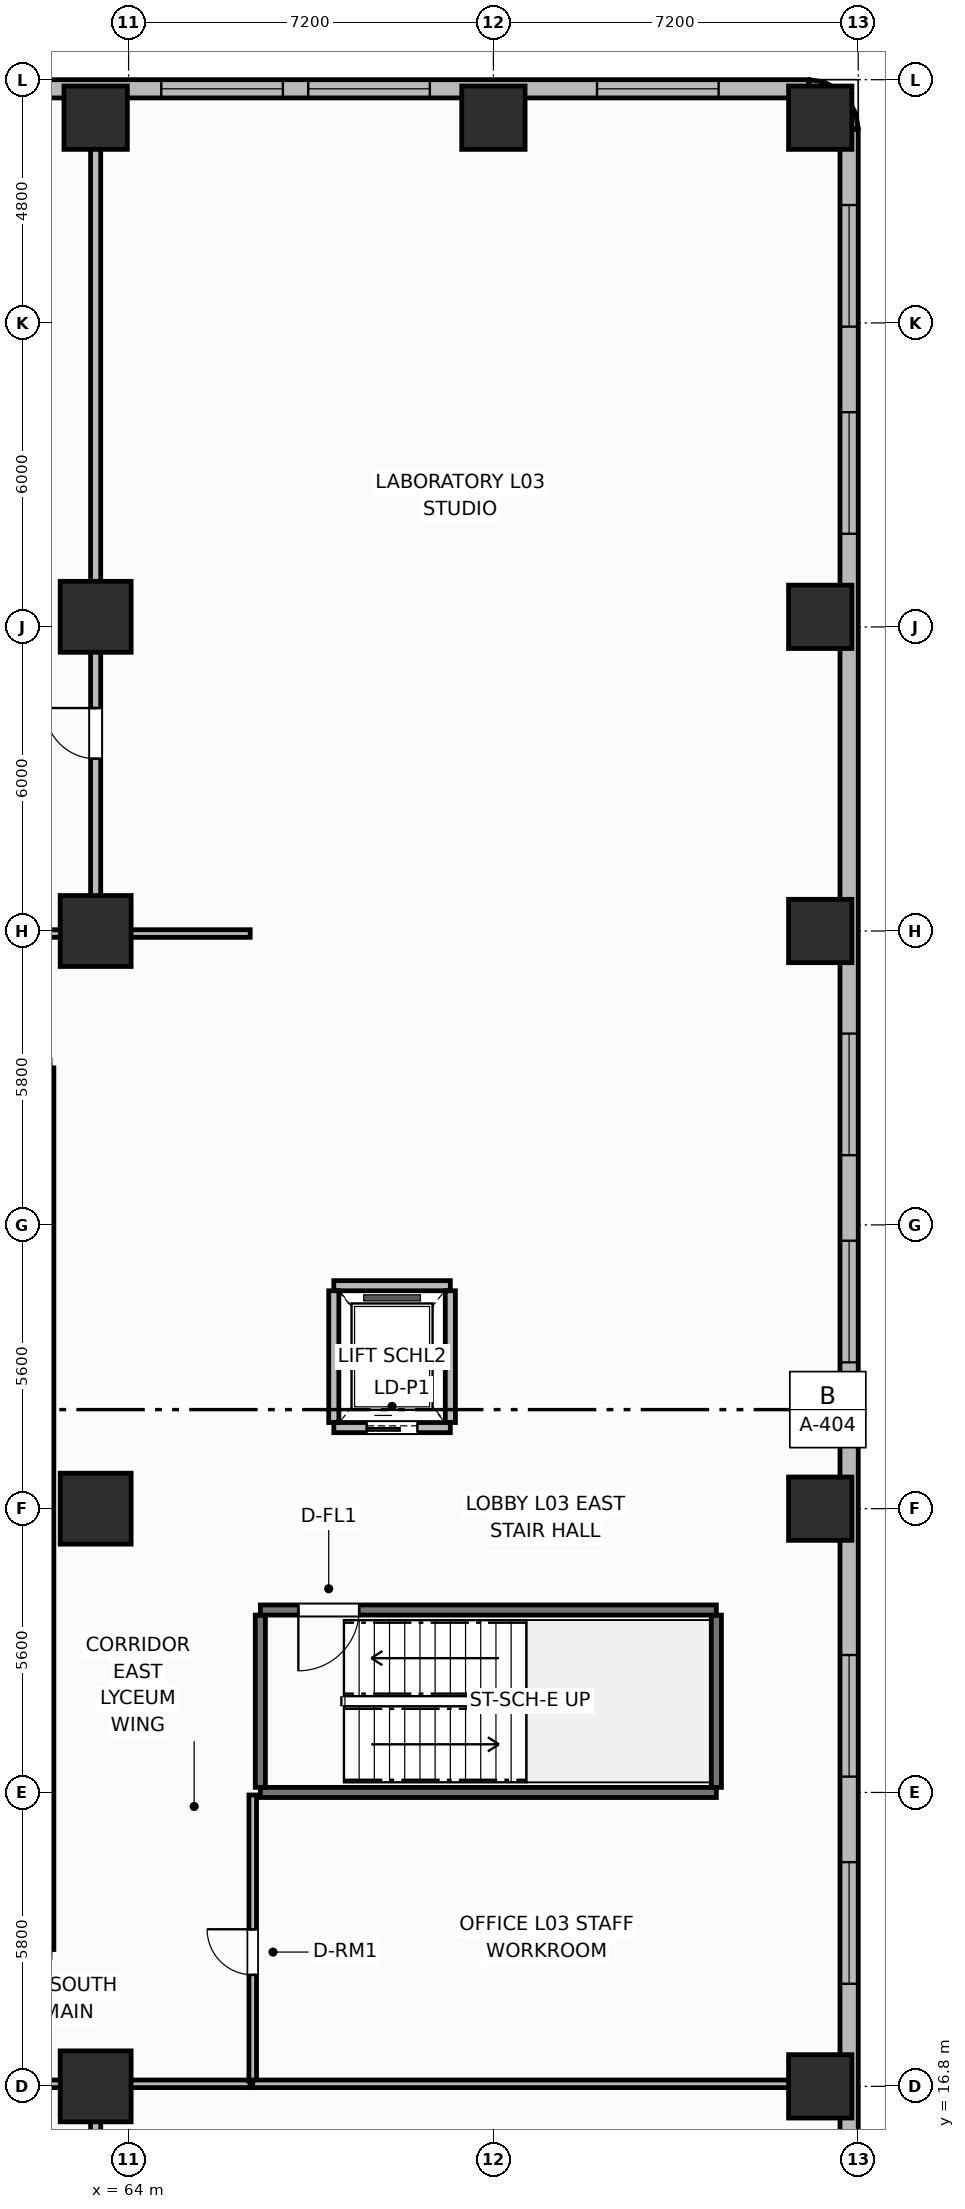
"""IFC4 building model, lengths in metres.
Left out: names, types, materials, properties, quantities, classifications, styles, units other than length and angle.
Written with IfcOpenShell. Run it as: python <this file> out.ifc"""

import sys

from ifc_helpers import new_model, si_unit, direction, frame, frame_2d, origin, origin_2d, place, context, subcontext, project, spatial, rectangle, extrude, element, fill, save


model = new_model("IFC4")
c1 = context("Model", 3, precision=1e-05, world=origin(), true_north=direction((0.0, 1.0)))
c2 = subcontext(c1, "Body", "Model", "MODEL_VIEW")
j1 = project(units=[si_unit("LENGTHUNIT", "METRE"), si_unit("PLANEANGLEUNIT", "RADIAN")], contexts=[c1])
p1 = place(None, origin())
s1 = spatial("IfcSite", under=j1, at=p1, CompositionType="ELEMENT")
p2 = place(p1, origin())
s2 = spatial("IfcBuilding", under=s1, at=p2, CompositionType="ELEMENT")
p3 = place(p2, frame((0.0, 0.0, 15.6)))
s3 = spatial("IfcBuildingStorey", under=s2, at=p3, CompositionType="ELEMENT", Elevation=15.6)
for number, where, z_axis, x_axis in (
    (1, (63.35, 55.65, 0.0), (0.0, 0.0, 1.0), (1.0, 0.0, 0.0)),
    (2, (71.2, 55.65, 0.0), (0.0, 0.0, 1.0), (1.0, 0.0, 0.0)),
    (3, (77.65, 16.8, 0.0), (0.0, 0.0, 1.0), (1.0, 0.0, 0.0)),
    (4, (77.65, 28.2, 0.0), (0.0, 0.0, 1.0), (1.0, 0.0, 0.0)),
    (5, (77.65, 39.6, 0.0), (0.0, 0.0, 1.0), (1.0, 0.0, 0.0)),
    (6, (77.65, 45.8, 0.0), (0.0, 0.0, 1.0), (1.0, 0.0, 0.0)),
    (7, (77.65, 55.65, 0.0), (0.0, 0.0, 1.0), (1.0, 0.0, 0.0)),
):
    element("IfcColumn", number, at=place(p3, frame(where, z_axis=z_axis, x_axis=x_axis)), inside=s3, PredefinedType="COLUMN", context=c2, shape_type="SweptSolid", body=[
        extrude(rectangle(XDim=1.25, YDim=1.25, at=origin_2d()), origin(), (0.0, 0.0, 1.0), 4.5),
    ])
for number, where, z_axis, x_axis in (
    (8, (63.35, 16.8, 0.0), (0.0, 0.0, 1.0), (1.0, 0.0, 0.0)),
    (9, (63.35, 28.2, 0.0), (0.0, 0.0, 1.0), (1.0, 0.0, 0.0)),
    (10, (63.35, 39.6, 0.0), (0.0, 0.0, 1.0), (1.0, 0.0, 0.0)),
    (11, (63.35, 45.8, 0.0), (0.0, 0.0, 1.0), (1.0, 0.0, 0.0)),
):
    element("IfcColumn", number, at=place(p3, frame(where, z_axis=z_axis, x_axis=x_axis)), inside=s3, PredefinedType="COLUMN", context=c2, shape_type="SweptSolid", body=[
        extrude(rectangle(XDim=1.4, YDim=1.4, at=origin_2d()), origin(), (0.0, 0.0, 1.0), 4.5),
    ])
p4 = place(p3, frame((78.22, 0.98, 0.0), z_axis=(0.0, 0.0, 1.0), x_axis=(0.0, 1.0, 0.0)))
e12 = element("IfcWall", 12, at=p4, inside=s3, PredefinedType="SOLIDWALL", context=c2, shape_type="SweptSolid", body=[
    extrude(rectangle(XDim=54.44, YDim=0.36, at=frame_2d((27.22, 0.0))), origin(), (0.0, 0.0, 1.0), 3.48),
])
p5 = place(p4, frame((1.494, 0.0, 0.85)))
e13 = element("IfcOpeningElement", 13, at=p5, cuts=e12, PredefinedType="OPENING", context=c2, shape_type="SweptSolid", body=[
    extrude(rectangle(XDim=2.4, YDim=2.25, at=frame_2d((1.2, 1.125))), frame((0.0, 0.19, 0.0), z_axis=(0.0, -1.0, 0.0), x_axis=(1.0, 0.0, 0.0)), (0.0, 0.0, 1.0), 0.38),
])
p6 = place(p4, frame((5.582, 0.0, 0.85)))
e14 = element("IfcOpeningElement", 14, at=p6, cuts=e12, PredefinedType="OPENING", context=c2, shape_type="SweptSolid", body=[
    extrude(rectangle(XDim=2.4, YDim=2.25, at=frame_2d((1.2, 1.125))), frame((0.0, 0.19, 0.0), z_axis=(0.0, -1.0, 0.0), x_axis=(1.0, 0.0, 0.0)), (0.0, 0.0, 1.0), 0.38),
])
p7 = place(p4, frame((17.844, 0.0, 0.85)))
e15 = element("IfcOpeningElement", 15, at=p7, cuts=e12, PredefinedType="OPENING", context=c2, shape_type="SweptSolid", body=[
    extrude(rectangle(XDim=2.4, YDim=2.25, at=frame_2d((1.2, 1.125))), frame((0.0, 0.19, 0.0), z_axis=(0.0, -1.0, 0.0), x_axis=(1.0, 0.0, 0.0)), (0.0, 0.0, 1.0), 0.38),
])
p8 = place(p4, frame((21.932, 0.0, 0.85)))
e16 = element("IfcOpeningElement", 16, at=p8, cuts=e12, PredefinedType="OPENING", context=c2, shape_type="SweptSolid", body=[
    extrude(rectangle(XDim=2.4, YDim=2.25, at=frame_2d((1.2, 1.125))), frame((0.0, 0.19, 0.0), z_axis=(0.0, -1.0, 0.0), x_axis=(1.0, 0.0, 0.0)), (0.0, 0.0, 1.0), 0.38),
])
p9 = place(p4, frame((30.108, 0.0, 0.85)))
e17 = element("IfcOpeningElement", 17, at=p9, cuts=e12, PredefinedType="OPENING", context=c2, shape_type="SweptSolid", body=[
    extrude(rectangle(XDim=2.4, YDim=2.25, at=frame_2d((1.2, 1.125))), frame((0.0, 0.19, 0.0), z_axis=(0.0, -1.0, 0.0), x_axis=(1.0, 0.0, 0.0)), (0.0, 0.0, 1.0), 0.38),
])
p10 = place(p4, frame((34.195, 0.0, 0.85)))
e18 = element("IfcOpeningElement", 18, at=p10, cuts=e12, PredefinedType="OPENING", context=c2, shape_type="SweptSolid", body=[
    extrude(rectangle(XDim=2.4, YDim=2.25, at=frame_2d((1.2, 1.125))), frame((0.0, 0.19, 0.0), z_axis=(0.0, -1.0, 0.0), x_axis=(1.0, 0.0, 0.0)), (0.0, 0.0, 1.0), 0.38),
])
p11 = place(p4, frame((46.458, 0.0, 0.85)))
e19 = element("IfcOpeningElement", 19, at=p11, cuts=e12, PredefinedType="OPENING", context=c2, shape_type="SweptSolid", body=[
    extrude(rectangle(XDim=2.4, YDim=2.25, at=frame_2d((1.2, 1.125))), frame((0.0, 0.19, 0.0), z_axis=(0.0, -1.0, 0.0), x_axis=(1.0, 0.0, 0.0)), (0.0, 0.0, 1.0), 0.38),
])
p12 = place(p4, frame((50.546, 0.0, 0.85)))
e20 = element("IfcOpeningElement", 20, at=p12, cuts=e12, PredefinedType="OPENING", context=c2, shape_type="SweptSolid", body=[
    extrude(rectangle(XDim=2.4, YDim=2.25, at=frame_2d((1.2, 1.125))), frame((0.0, 0.19, 0.0), z_axis=(0.0, -1.0, 0.0), x_axis=(1.0, 0.0, 0.0)), (0.0, 0.0, 1.0), 0.38),
])
p13 = place(p3, frame((78.22, 55.42, 0.0), z_axis=(0.0, 0.0, 1.0), x_axis=(-0.156012644899, 0.987755058014, 0.0)))
e21 = element("IfcWall", 21, at=p13, inside=s3, PredefinedType="SOLIDWALL", context=c2, shape_type="SweptSolid", body=[
    extrude(rectangle(XDim=0.25, YDim=0.36, at=frame_2d((0.125, 0.0))), origin(), (0.0, 0.0, 1.0), 3.48),
])
for number, where, z_axis, x_axis in (
    (22, (78.181, 55.667, 0.0), (0.0, 0.0, 1.0), (-0.455, 0.891, 0.0)),
    (23, (78.067, 55.89, 0.0), (0.0, 0.0, 1.0), (-0.707, 0.707, 0.0)),
    (24, (77.89, 56.067, 0.0), (0.0, 0.0, 1.0), (-0.891, 0.455, 0.0)),
):
    element("IfcWall", number, at=place(p3, frame(where, z_axis=z_axis, x_axis=x_axis)), inside=s3, PredefinedType="SOLIDWALL", context=c2, shape_type="SweptSolid", body=[
        extrude(rectangle(XDim=0.25, YDim=0.36, at=frame_2d((0.125, 0.0))), origin(), (0.0, 0.0, 1.0), 3.48),
    ])
p14 = place(p3, frame((77.667, 56.181, 0.0), z_axis=(0.0, 0.0, 1.0), x_axis=(-0.987755058014, 0.156012644899, 0.0)))
e25 = element("IfcWall", 25, at=p14, inside=s3, PredefinedType="SOLIDWALL", context=c2, shape_type="SweptSolid", body=[
    extrude(rectangle(XDim=0.25, YDim=0.36, at=frame_2d((0.125, 0.0))), origin(), (0.0, 0.0, 1.0), 3.48),
])
p15 = place(p3, frame((77.42, 56.22, 0.0), z_axis=(0.0, 0.0, 1.0), x_axis=(-1.0, 0.0, 0.0)))
e26 = element("IfcWall", 26, at=p15, inside=s3, PredefinedType="SOLIDWALL", context=c2, shape_type="SweptSolid", body=[
    extrude(rectangle(XDim=15.25, YDim=0.36, at=frame_2d((7.625, 0.0))), origin(), (0.0, 0.0, 1.0), 3.48),
])
p16 = place(p15, frame((1.775, 0.0, 0.85)))
e27 = element("IfcOpeningElement", 27, at=p16, cuts=e26, PredefinedType="OPENING", context=c2, shape_type="SweptSolid", body=[
    extrude(rectangle(XDim=2.4, YDim=2.25, at=frame_2d((1.2, 1.125))), frame((0.0, 0.19, 0.0), z_axis=(0.0, -1.0, 0.0), x_axis=(1.0, 0.0, 0.0)), (0.0, 0.0, 1.0), 0.38),
])
p17 = place(p15, frame((7.475, 0.0, 0.85)))
e28 = element("IfcOpeningElement", 28, at=p17, cuts=e26, PredefinedType="OPENING", context=c2, shape_type="SweptSolid", body=[
    extrude(rectangle(XDim=2.4, YDim=2.25, at=frame_2d((1.2, 1.125))), frame((0.0, 0.19, 0.0), z_axis=(0.0, -1.0, 0.0), x_axis=(1.0, 0.0, 0.0)), (0.0, 0.0, 1.0), 0.38),
])
p18 = place(p15, frame((10.375, 0.0, 0.85)))
e29 = element("IfcOpeningElement", 29, at=p18, cuts=e26, PredefinedType="OPENING", context=c2, shape_type="SweptSolid", body=[
    extrude(rectangle(XDim=2.4, YDim=2.25, at=frame_2d((1.2, 1.125))), frame((0.0, 0.19, 0.0), z_axis=(0.0, -1.0, 0.0), x_axis=(1.0, 0.0, 0.0)), (0.0, 0.0, 1.0), 0.38),
])
p19 = place(p3, frame((66.6, 22.6, 0.0), z_axis=(0.0, 0.0, 1.0), x_axis=(1.0, 0.0, 0.0)))
e30 = element("IfcWall", 30, at=p19, inside=s3, PredefinedType="SHEAR", context=c2, shape_type="SweptSolid", body=[
    extrude(rectangle(XDim=9.0, YDim=0.2, at=frame_2d((4.5, 0.0))), origin(), (0.0, 0.0, 1.0), 4.5),
])
for number, where, z_axis, x_axis in (
    (31, (66.6, 22.7, 0.0), (0.0, 0.0, 1.0), (0.0, 1.0, 0.0)),
    (32, (75.6, 22.7, 0.0), (0.0, 0.0, 1.0), (0.0, 1.0, 0.0)),
):
    element("IfcWall", number, at=place(p3, frame(where, z_axis=z_axis, x_axis=x_axis)), inside=s3, PredefinedType="SHEAR", context=c2, shape_type="SweptSolid", body=[
        extrude(rectangle(XDim=3.4, YDim=0.2, at=frame_2d((1.7, 0.0))), origin(), (0.0, 0.0, 1.0), 4.5),
    ])
p20 = place(p3, frame((75.6, 26.2, 0.0), z_axis=(0.0, 0.0, 1.0), x_axis=(-1.0, 0.0, 0.0)))
e33 = element("IfcWall", 33, at=p20, inside=s3, PredefinedType="SHEAR", context=c2, shape_type="SweptSolid", body=[
    extrude(rectangle(XDim=9.0, YDim=0.2, at=frame_2d((4.5, 0.0))), origin(), (0.0, 0.0, 1.0), 4.5),
])
p21 = place(p20, frame((7.05, 0.0, 0.0)))
e34 = element("IfcOpeningElement", 34, at=p21, cuts=e33, PredefinedType="OPENING", context=c2, shape_type="SweptSolid", body=[
    extrude(rectangle(XDim=1.2, YDim=2.15, at=frame_2d((0.6, 1.075))), frame((0.0, 0.11, 0.0), z_axis=(0.0, -1.0, 0.0), x_axis=(1.0, 0.0, 0.0)), (0.0, 0.0, 1.0), 0.22),
])
p22 = place(p3, frame((68.05, 32.6, 0.0), z_axis=(0.0, 0.0, 1.0), x_axis=(1.0, 0.0, 0.0)))
e35 = element("IfcWall", 35, at=p22, inside=s3, PredefinedType="PARTITIONING", context=c2, shape_type="SweptSolid", body=[
    extrude(rectangle(XDim=2.3, YDim=0.2, at=frame_2d((1.15, 0.0))), origin(), (0.0, 0.0, 1.0), 3.42),
])
for number, where, z_axis, x_axis in (
    (36, (68.05, 29.9, 0.0), (0.0, 0.0, 1.0), (0.0, 1.0, 0.0)),
    (37, (70.35, 29.9, 0.0), (0.0, 0.0, 1.0), (0.0, 1.0, 0.0)),
):
    element("IfcWall", number, at=place(p3, frame(where, z_axis=z_axis, x_axis=x_axis)), inside=s3, PredefinedType="PARTITIONING", context=c2, shape_type="SweptSolid", body=[
        extrude(rectangle(XDim=2.6, YDim=0.2, at=frame_2d((1.3, 0.0))), origin(), (0.0, 0.0, 1.0), 3.42),
    ])
p23 = place(p3, frame((68.05, 29.8, 0.0), z_axis=(0.0, 0.0, 1.0), x_axis=(1.0, 0.0, 0.0)))
e38 = element("IfcWall", 38, at=p23, inside=s3, PredefinedType="PARTITIONING", context=c2, shape_type="SweptSolid", body=[
    extrude(rectangle(XDim=2.3, YDim=0.2, at=frame_2d((1.15, 0.0))), origin(), (0.0, 0.0, 1.0), 3.42),
])
p24 = place(p23, frame((0.65, 0.0, 0.0)))
e39 = element("IfcOpeningElement", 39, at=p24, cuts=e38, PredefinedType="OPENING", context=c2, shape_type="SweptSolid", body=[
    extrude(rectangle(XDim=1.0, YDim=2.15, at=frame_2d((0.5, 1.075))), frame((0.0, 0.11, 0.0), z_axis=(0.0, -1.0, 0.0), x_axis=(1.0, 0.0, 0.0)), (0.0, 0.0, 1.0), 0.22),
])
p25 = place(p3, frame((62.45, 19.5, 0.0), z_axis=(0.0, 0.0, 1.0), x_axis=(0.0, 1.0, 0.0)))
e40 = element("IfcWall", 40, at=p25, inside=s3, PredefinedType="PARTITIONING", context=c2, shape_type="SweptSolid", body=[
    extrude(rectangle(XDim=17.4, YDim=0.15, at=frame_2d((8.7, 0.0))), origin(), (0.0, 0.0, 1.0), 3.42),
])
p26 = place(p3, frame((63.35, 0.4, 0.0), z_axis=(0.0, 0.0, 1.0), x_axis=(0.0, 1.0, 0.0)))
e41 = element("IfcWall", 41, at=p26, inside=s3, PredefinedType="PARTITIONING", context=c2, shape_type="SweptSolid", body=[
    extrude(rectangle(XDim=16.4, YDim=0.2, at=frame_2d((8.2, 0.0))), origin(), (0.0, 0.0, 1.0), 3.42),
])
p27 = place(p26, frame((5.5, 0.0, 0.0)))
e42 = element("IfcOpeningElement", 42, at=p27, cuts=e41, PredefinedType="OPENING", context=c2, shape_type="SweptSolid", body=[
    extrude(rectangle(XDim=1.0, YDim=2.15, at=frame_2d((0.5, 1.075))), frame((0.0, 0.11, 0.0), z_axis=(0.0, -1.0, 0.0), x_axis=(1.0, 0.0, 0.0)), (0.0, 0.0, 1.0), 0.22),
])
p28 = place(p3, frame((53.15, 16.85, 0.0), z_axis=(0.0, 0.0, 1.0), x_axis=(1.0, 0.0, 0.0)))
e43 = element("IfcWall", 43, at=p28, inside=s3, PredefinedType="PARTITIONING", context=c2, shape_type="SweptSolid", body=[
    extrude(rectangle(XDim=13.25, YDim=0.15, at=frame_2d((6.625, 0.0))), origin(), (0.0, 0.0, 1.0), 3.42),
])
p29 = place(p28, frame((4.2, 0.0, 0.0)))
e44 = element("IfcOpeningElement", 44, at=p29, cuts=e43, PredefinedType="OPENING", context=c2, shape_type="SweptSolid", body=[
    extrude(rectangle(XDim=1.0, YDim=2.15, at=frame_2d((0.5, 1.075))), frame((0.0, 0.085, 0.0), z_axis=(0.0, -1.0, 0.0), x_axis=(1.0, 0.0, 0.0)), (0.0, 0.0, 1.0), 0.17),
])
p30 = place(p3, frame((66.45, 16.9, 0.0), z_axis=(0.0, 0.0, 1.0), x_axis=(0.0, 1.0, 0.0)))
e45 = element("IfcWall", 45, at=p30, inside=s3, PredefinedType="PARTITIONING", context=c2, shape_type="SweptSolid", body=[
    extrude(rectangle(XDim=5.65, YDim=0.15, at=frame_2d((2.825, 0.0))), origin(), (0.0, 0.0, 1.0), 3.42),
])
p31 = place(p30, frame((2.1, 0.0, 0.0)))
e46 = element("IfcOpeningElement", 46, at=p31, cuts=e45, PredefinedType="OPENING", context=c2, shape_type="SweptSolid", body=[
    extrude(rectangle(XDim=0.9, YDim=2.1, at=frame_2d((0.45, 1.05))), frame((0.0, 0.085, 0.0), z_axis=(0.0, -1.0, 0.0), x_axis=(1.0, 0.0, 0.0)), (0.0, 0.0, 1.0), 0.17),
])
p32 = place(p3, frame((66.45, 16.85, 0.0), z_axis=(0.0, 0.0, 1.0), x_axis=(1.0, 0.0, 0.0)))
e47 = element("IfcWall", 47, at=p32, inside=s3, PredefinedType="PARTITIONING", context=c2, shape_type="SweptSolid", body=[
    extrude(rectangle(XDim=11.55, YDim=0.15, at=frame_2d((5.775, 0.0))), origin(), (0.0, 0.0, 1.0), 3.42),
])
p33 = place(p3, frame((63.35, 39.6, 0.0), z_axis=(0.0, 0.0, 1.0), x_axis=(0.0, 1.0, 0.0)))
e48 = element("IfcWall", 48, at=p33, inside=s3, PredefinedType="PARTITIONING", context=c2, shape_type="SweptSolid", body=[
    extrude(rectangle(XDim=16.4, YDim=0.2, at=frame_2d((8.2, 0.0))), origin(), (0.0, 0.0, 1.0), 3.42),
])
p34 = place(p33, frame((3.4, 0.0, 0.0)))
e49 = element("IfcOpeningElement", 49, at=p34, cuts=e48, PredefinedType="OPENING", context=c2, shape_type="SweptSolid", body=[
    extrude(rectangle(XDim=1.0, YDim=2.15, at=frame_2d((0.5, 1.075))), frame((0.0, 0.11, 0.0), z_axis=(0.0, -1.0, 0.0), x_axis=(1.0, 0.0, 0.0)), (0.0, 0.0, 1.0), 0.22),
])
p35 = place(p3, frame((66.4, 39.55, 0.0), z_axis=(0.0, 0.0, 1.0), x_axis=(-1.0, 0.0, 0.0)))
e50 = element("IfcWall", 50, at=p35, inside=s3, PredefinedType="PARTITIONING", context=c2, shape_type="SweptSolid", body=[
    extrude(rectangle(XDim=13.25, YDim=0.15, at=frame_2d((6.625, 0.0))), origin(), (0.0, 0.0, 1.0), 3.42),
])
p36 = place(p35, frame((5.5, 0.0, 0.0)))
e51 = element("IfcOpeningElement", 51, at=p36, cuts=e50, PredefinedType="OPENING", context=c2, shape_type="SweptSolid", body=[
    extrude(rectangle(XDim=1.0, YDim=2.15, at=frame_2d((0.5, 1.075))), frame((0.0, 0.085, 0.0), z_axis=(0.0, -1.0, 0.0), x_axis=(1.0, 0.0, 0.0)), (0.0, 0.0, 1.0), 0.17),
])
p37 = place(p7, origin())
e52 = element("IfcWindow", 52, at=p37, inside=s3, PartitioningType="SINGLE_PANEL", PredefinedType="WINDOW", context=c2, shape_type="SweptSolid", body=[
    extrude(rectangle(XDim=2.4, YDim=2.25, at=frame_2d((1.2, 1.125))), frame((0.0, 0.03, 0.0), z_axis=(0.0, -1.0, 0.0), x_axis=(1.0, 0.0, 0.0)), (0.0, 0.0, 1.0), 0.06),
])
fill(e15, e52)
p38 = place(p8, origin())
e53 = element("IfcWindow", 53, at=p38, inside=s3, PartitioningType="SINGLE_PANEL", PredefinedType="WINDOW", context=c2, shape_type="SweptSolid", body=[
    extrude(rectangle(XDim=2.4, YDim=2.25, at=frame_2d((1.2, 1.125))), frame((0.0, 0.03, 0.0), z_axis=(0.0, -1.0, 0.0), x_axis=(1.0, 0.0, 0.0)), (0.0, 0.0, 1.0), 0.06),
])
fill(e16, e53)
p39 = place(p9, origin())
e54 = element("IfcWindow", 54, at=p39, inside=s3, PartitioningType="SINGLE_PANEL", PredefinedType="WINDOW", context=c2, shape_type="SweptSolid", body=[
    extrude(rectangle(XDim=2.4, YDim=2.25, at=frame_2d((1.2, 1.125))), frame((0.0, 0.03, 0.0), z_axis=(0.0, -1.0, 0.0), x_axis=(1.0, 0.0, 0.0)), (0.0, 0.0, 1.0), 0.06),
])
fill(e17, e54)
p40 = place(p10, origin())
e55 = element("IfcWindow", 55, at=p40, inside=s3, PartitioningType="SINGLE_PANEL", PredefinedType="WINDOW", context=c2, shape_type="SweptSolid", body=[
    extrude(rectangle(XDim=2.4, YDim=2.25, at=frame_2d((1.2, 1.125))), frame((0.0, 0.03, 0.0), z_axis=(0.0, -1.0, 0.0), x_axis=(1.0, 0.0, 0.0)), (0.0, 0.0, 1.0), 0.06),
])
fill(e18, e55)
p41 = place(p11, origin())
e56 = element("IfcWindow", 56, at=p41, inside=s3, PartitioningType="SINGLE_PANEL", PredefinedType="WINDOW", context=c2, shape_type="SweptSolid", body=[
    extrude(rectangle(XDim=2.4, YDim=2.25, at=frame_2d((1.2, 1.125))), frame((0.0, 0.03, 0.0), z_axis=(0.0, -1.0, 0.0), x_axis=(1.0, 0.0, 0.0)), (0.0, 0.0, 1.0), 0.06),
])
fill(e19, e56)
p42 = place(p12, origin())
e57 = element("IfcWindow", 57, at=p42, inside=s3, PartitioningType="SINGLE_PANEL", PredefinedType="WINDOW", context=c2, shape_type="SweptSolid", body=[
    extrude(rectangle(XDim=2.4, YDim=2.25, at=frame_2d((1.2, 1.125))), frame((0.0, 0.03, 0.0), z_axis=(0.0, -1.0, 0.0), x_axis=(1.0, 0.0, 0.0)), (0.0, 0.0, 1.0), 0.06),
])
fill(e20, e57)
p43 = place(p16, origin())
e58 = element("IfcWindow", 58, at=p43, inside=s3, PartitioningType="SINGLE_PANEL", PredefinedType="WINDOW", context=c2, shape_type="SweptSolid", body=[
    extrude(rectangle(XDim=2.4, YDim=2.25, at=frame_2d((1.2, 1.125))), frame((0.0, 0.03, 0.0), z_axis=(0.0, -1.0, 0.0), x_axis=(1.0, 0.0, 0.0)), (0.0, 0.0, 1.0), 0.06),
])
fill(e27, e58)
p44 = place(p17, origin())
e59 = element("IfcWindow", 59, at=p44, inside=s3, PartitioningType="SINGLE_PANEL", PredefinedType="WINDOW", context=c2, shape_type="SweptSolid", body=[
    extrude(rectangle(XDim=2.4, YDim=2.25, at=frame_2d((1.2, 1.125))), frame((0.0, 0.03, 0.0), z_axis=(0.0, -1.0, 0.0), x_axis=(1.0, 0.0, 0.0)), (0.0, 0.0, 1.0), 0.06),
])
fill(e28, e59)
p45 = place(p18, origin())
e60 = element("IfcWindow", 60, at=p45, inside=s3, PartitioningType="SINGLE_PANEL", PredefinedType="WINDOW", context=c2, shape_type="SweptSolid", body=[
    extrude(rectangle(XDim=2.4, YDim=2.25, at=frame_2d((1.2, 1.125))), frame((0.0, 0.03, 0.0), z_axis=(0.0, -1.0, 0.0), x_axis=(1.0, 0.0, 0.0)), (0.0, 0.0, 1.0), 0.06),
])
fill(e29, e60)
p46 = place(p21, origin())
e61 = element("IfcDoor", 61, at=p46, inside=s3, OperationType="SINGLE_SWING_RIGHT", PredefinedType="DOOR", context=c2, shape_type="SweptSolid", body=[
    extrude(rectangle(XDim=1.2, YDim=2.15, at=frame_2d((0.6, 1.075))), frame((0.0, 0.025, 0.0), z_axis=(0.0, -1.0, 0.0), x_axis=(1.0, 0.0, 0.0)), (0.0, 0.0, 1.0), 0.05),
])
fill(e34, e61)
p47 = place(p24, origin())
e62 = element("IfcDoor", 62, at=p47, inside=s3, OperationType="SLIDING_TO_LEFT", PredefinedType="DOOR", context=c2, shape_type="SweptSolid", body=[
    extrude(rectangle(XDim=1.0, YDim=2.15, at=frame_2d((0.5, 1.075))), frame((0.0, 0.025, 0.0), z_axis=(0.0, -1.0, 0.0), x_axis=(1.0, 0.0, 0.0)), (0.0, 0.0, 1.0), 0.05),
])
fill(e39, e62)
p48 = place(p31, origin())
e63 = element("IfcDoor", 63, at=p48, inside=s3, OperationType="SINGLE_SWING_RIGHT", PredefinedType="DOOR", context=c2, shape_type="SweptSolid", body=[
    extrude(rectangle(XDim=0.9, YDim=2.1, at=frame_2d((0.45, 1.05))), frame((0.0, 0.025, 0.0), z_axis=(0.0, -1.0, 0.0), x_axis=(1.0, 0.0, 0.0)), (0.0, 0.0, 1.0), 0.05),
])
fill(e46, e63)
p49 = place(p34, origin())
e64 = element("IfcDoor", 64, at=p49, inside=s3, OperationType="SINGLE_SWING_RIGHT", PredefinedType="DOOR", context=c2, shape_type="SweptSolid", body=[
    extrude(rectangle(XDim=1.0, YDim=2.15, at=frame_2d((0.5, 1.075))), frame((0.0, 0.025, 0.0), z_axis=(0.0, -1.0, 0.0), x_axis=(1.0, 0.0, 0.0)), (0.0, 0.0, 1.0), 0.05),
])
fill(e49, e64)
save(model, sys.argv[1])
